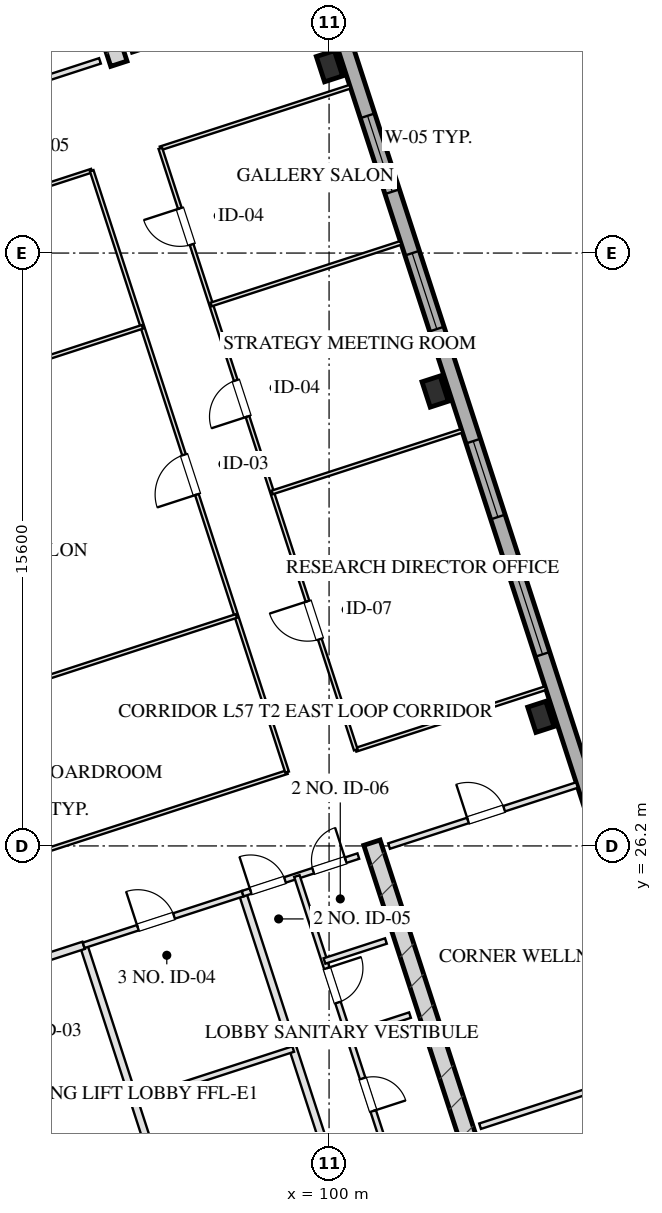
"""IFC4 building model, lengths in metres.
Left out: names, types, materials, properties, quantities, classifications, styles, units other than length and angle.
Written with IfcOpenShell. Run it as: python <this file> out.ifc"""

import sys

from ifc_helpers import new_model, si_unit, direction, frame, frame_2d, origin, origin_2d, place, context, subcontext, project, spatial, rectangle, hollow_rectangle, extrude, element, fill, save


model = new_model("IFC4")
c1 = context("Model", 3, precision=1e-05, world=origin(), true_north=direction((0.0, 1.0)))
c2 = subcontext(c1, "Body", "Model", "MODEL_VIEW")
j1 = project(units=[si_unit("LENGTHUNIT", "METRE"), si_unit("PLANEANGLEUNIT", "RADIAN")], contexts=[c1])
p1 = place(None, origin())
s1 = spatial("IfcSite", under=j1, at=p1, CompositionType="ELEMENT")
p2 = place(p1, origin())
s2 = spatial("IfcBuilding", under=s1, at=p2, CompositionType="ELEMENT")
p3 = place(p2, frame((0.0, 0.0, 212.75)))
s3 = spatial("IfcBuildingStorey", under=s2, at=p3, CompositionType="ELEMENT", Elevation=212.75)
p4 = place(p3, frame((101.128, 26.286, 0.0), z_axis=(0.0, 0.0, 1.0), x_axis=(0.309004419953, -0.951060601881, 0.0)))
e1 = element("IfcWall", 1, at=p4, inside=s3, PredefinedType="SHEAR", context=c2, shape_type="SweptSolid", body=[
    extrude(rectangle(XDim=9.33, YDim=0.45, at=frame_2d((4.665, 0.0))), origin(), (0.0, 0.0, 1.0), 3.45),
])
p5 = place(p3, frame((90.486, 20.594, 0.0), z_axis=(0.0, 0.0, 1.0), x_axis=(0.309020428229, -0.951055400562, 0.0)))
e2 = element("IfcWall", 2, at=p5, inside=s3, PredefinedType="SHEAR", context=c2, shape_type="SweptSolid", body=[
    extrude(rectangle(XDim=6.98, YDim=0.35, at=frame_2d((3.49, 0.0))), origin(), (0.0, 0.0, 1.0), 3.45),
])
p6 = place(p3, frame((94.469, 46.781, 0.0), z_axis=(0.0, 0.0, 1.0), x_axis=(-0.309004419953, 0.951060601881, 0.0)))
e3 = element("IfcWall", 3, at=p6, inside=s3, PredefinedType="SHEAR", context=c2, shape_type="SweptSolid", body=[
    extrude(rectangle(XDim=9.33, YDim=0.45, at=frame_2d((4.665, 0.0))), origin(), (0.0, 0.0, 1.0), 3.45),
])
for number, where, z_axis, x_axis in (
    (4, (105.573, 29.597, 0.0), (0.0, 0.0, 1.0), (0.951, 0.309, 0.0)),
    (5, (102.792, 38.156, 0.0), (0.0, 0.0, 1.0), (0.951, 0.309, 0.0)),
    (6, (100.01, 46.716, 0.0), (0.0, 0.0, 1.0), (0.951, 0.309, 0.0)),
):
    element("IfcColumn", number, at=place(p3, frame(where, z_axis=z_axis, x_axis=x_axis)), inside=s3, PredefinedType="COLUMN", context=c2, shape_type="SweptSolid", body=[
        extrude(hollow_rectangle(XDim=0.5, YDim=0.7, WallThickness=0.025, at=origin_2d()), origin(), (0.0, 0.0, 1.0), 3.451),
    ])
p7 = place(p3, frame((97.382, 56.586, 0.0), z_axis=(0.0, 0.0, 1.0), x_axis=(0.309016491071, -0.951056679828, 0.0)))
e7 = element("IfcWall", 7, at=p7, inside=s3, PredefinedType="SOLIDWALL", context=c2, shape_type="SweptSolid", body=[
    extrude(rectangle(XDim=38.4, YDim=0.4, at=frame_2d((19.2, 0.0))), origin(), (0.0, 0.0, 1.0), 2.55),
])
p8 = place(p7, frame((24.55, 0.0, 0.75)))
e8 = element("IfcOpeningElement", 8, at=p8, cuts=e7, PredefinedType="OPENING", context=c2, shape_type="SweptSolid", body=[
    extrude(rectangle(XDim=2.1, YDim=1.4, at=frame_2d((1.05, 0.7))), frame((0.0, 0.21, 0.0), z_axis=(0.0, -1.0, 0.0), x_axis=(1.0, 0.0, 0.0)), (0.0, 0.0, 1.0), 0.42),
])
p9 = place(p7, frame((20.75, 0.0, 0.75)))
e9 = element("IfcOpeningElement", 9, at=p9, cuts=e7, PredefinedType="OPENING", context=c2, shape_type="SweptSolid", body=[
    extrude(rectangle(XDim=2.1, YDim=1.4, at=frame_2d((1.05, 0.7))), frame((0.0, 0.21, 0.0), z_axis=(0.0, -1.0, 0.0), x_axis=(1.0, 0.0, 0.0)), (0.0, 0.0, 1.0), 0.42),
])
p10 = place(p7, frame((15.55, 0.0, 0.75)))
e10 = element("IfcOpeningElement", 10, at=p10, cuts=e7, PredefinedType="OPENING", context=c2, shape_type="SweptSolid", body=[
    extrude(rectangle(XDim=2.1, YDim=1.4, at=frame_2d((1.05, 0.7))), frame((0.0, 0.21, 0.0), z_axis=(0.0, -1.0, 0.0), x_axis=(1.0, 0.0, 0.0)), (0.0, 0.0, 1.0), 0.42),
])
p11 = place(p7, frame((11.75, 0.0, 0.75)))
e11 = element("IfcOpeningElement", 11, at=p11, cuts=e7, PredefinedType="OPENING", context=c2, shape_type="SweptSolid", body=[
    extrude(rectangle(XDim=2.1, YDim=1.4, at=frame_2d((1.05, 0.7))), frame((0.0, 0.21, 0.0), z_axis=(0.0, -1.0, 0.0), x_axis=(1.0, 0.0, 0.0)), (0.0, 0.0, 1.0), 0.42),
])
p12 = place(p3, frame((93.542, 23.585, 0.0), z_axis=(0.0, 0.0, 1.0), x_axis=(0.309042196757, -0.951048327176, 0.0)))
e12 = element("IfcWall", 12, at=p12, inside=s3, PredefinedType="PARTITIONING", context=c2, shape_type="SweptSolid", body=[
    extrude(rectangle(XDim=8.43, YDim=0.2, at=frame_2d((4.215, 0.0))), origin(), (0.0, 0.0, 1.0), 3.155),
])
p13 = place(p3, frame((89.899, 22.401, 0.0), z_axis=(0.0, 0.0, 1.0), x_axis=(0.951046716504, 0.309047153403, 0.0)))
e13 = element("IfcWall", 13, at=p13, inside=s3, PredefinedType="PARTITIONING", context=c2, shape_type="SweptSolid", body=[
    extrude(rectangle(XDim=3.83, YDim=0.2, at=frame_2d((1.915, 0.0))), origin(), (0.0, 0.0, 1.0), 3.155),
])
p14 = place(p13, frame((1.35, 0.0, 0.0)))
e14 = element("IfcOpeningElement", 14, at=p14, cuts=e13, PredefinedType="OPENING", context=c2, shape_type="SweptSolid", body=[
    extrude(rectangle(XDim=1.2, YDim=2.05, at=frame_2d((0.6, 1.025))), frame((0.0, 0.11, 0.0), z_axis=(0.0, -1.0, 0.0), x_axis=(1.0, 0.0, 0.0)), (0.0, 0.0, 1.0), 0.22),
])
p15 = place(p3, frame((97.727, 24.944, 0.0), z_axis=(0.0, 0.0, 1.0), x_axis=(0.309016001439, -0.951056838919, 0.0)))
e15 = element("IfcWall", 15, at=p15, inside=s3, PredefinedType="PARTITIONING", context=c2, shape_type="SweptSolid", body=[
    extrude(rectangle(XDim=8.43, YDim=0.2, at=frame_2d((4.215, 0.0))), origin(), (0.0, 0.0, 1.0), 3.155),
])
p16 = place(p3, frame((93.542, 23.585, 0.0), z_axis=(0.0, 0.0, 1.0), x_axis=(0.951063829732, 0.308994485023, 0.0)))
e16 = element("IfcWall", 16, at=p16, inside=s3, PredefinedType="PARTITIONING", context=c2, shape_type="SweptSolid", body=[
    extrude(rectangle(XDim=4.4, YDim=0.15, at=frame_2d((2.2, 0.0))), origin(), (0.0, 0.0, 1.0), 3.155),
])
p17 = place(p16, frame((1.5, 0.0, 0.0)))
e17 = element("IfcOpeningElement", 17, at=p17, cuts=e16, PredefinedType="OPENING", context=c2, shape_type="SweptSolid", body=[
    extrude(rectangle(XDim=1.0, YDim=2.05, at=frame_2d((0.5, 1.025))), frame((0.0, 0.085, 0.0), z_axis=(0.0, -1.0, 0.0), x_axis=(1.0, 0.0, 0.0)), (0.0, 0.0, 1.0), 0.17),
])
p18 = place(p3, frame((94.871, 19.495, 0.0), z_axis=(0.0, 0.0, 1.0), x_axis=(0.951042223598, 0.309060979314, 0.0)))
e18 = element("IfcWall", 18, at=p18, inside=s3, PredefinedType="PARTITIONING", context=c2, shape_type="SweptSolid", body=[
    extrude(rectangle(XDim=4.4, YDim=0.15, at=frame_2d((2.2, 0.0))), origin(), (0.0, 0.0, 1.0), 3.155),
])
p19 = place(p3, frame((97.727, 24.944, 0.0), z_axis=(0.0, 0.0, 1.0), x_axis=(0.951036872128, 0.309077446369, 0.0)))
e19 = element("IfcWall", 19, at=p19, inside=s3, PredefinedType="PARTITIONING", context=c2, shape_type="SweptSolid", body=[
    extrude(rectangle(XDim=3.2, YDim=0.15, at=frame_2d((1.6, 0.0))), origin(), (0.0, 0.0, 1.0), 3.155),
])
p20 = place(p19, frame((0.22, 0.0, 0.0)))
e20 = element("IfcOpeningElement", 20, at=p20, cuts=e19, PredefinedType="OPENING", context=c2, shape_type="SweptSolid", body=[
    extrude(rectangle(XDim=0.95, YDim=2.05, at=frame_2d((0.475, 1.025))), frame((0.0, 0.085, 0.0), z_axis=(0.0, -1.0, 0.0), x_axis=(1.0, 0.0, 0.0)), (0.0, 0.0, 1.0), 0.17),
])
p21 = place(p19, frame((1.95, 0.0, 0.0)))
e21 = element("IfcOpeningElement", 21, at=p21, cuts=e19, PredefinedType="OPENING", context=c2, shape_type="SweptSolid", body=[
    extrude(rectangle(XDim=0.9, YDim=2.05, at=frame_2d((0.45, 1.025))), frame((0.0, 0.085, 0.0), z_axis=(0.0, -1.0, 0.0), x_axis=(1.0, 0.0, 0.0)), (0.0, 0.0, 1.0), 0.17),
])
p22 = place(p3, frame((99.153, 25.408, 0.0), z_axis=(0.0, 0.0, 1.0), x_axis=(0.309016001439, -0.951056838919, 0.0)))
e22 = element("IfcWall", 22, at=p22, inside=s3, PredefinedType="PARTITIONING", context=c2, shape_type="SweptSolid", body=[
    extrude(rectangle(XDim=8.43, YDim=0.15, at=frame_2d((4.215, 0.0))), origin(), (0.0, 0.0, 1.0), 3.155),
])
p23 = place(p22, frame((2.55, 0.0, 0.0)))
e23 = element("IfcOpeningElement", 23, at=p23, cuts=e22, PredefinedType="OPENING", context=c2, shape_type="SweptSolid", body=[
    extrude(rectangle(XDim=0.95, YDim=2.05, at=frame_2d((0.475, 1.025))), frame((0.0, 0.085, 0.0), z_axis=(0.0, -1.0, 0.0), x_axis=(1.0, 0.0, 0.0)), (0.0, 0.0, 1.0), 0.17),
])
p24 = place(p22, frame((5.6, 0.0, 0.0)))
e24 = element("IfcOpeningElement", 24, at=p24, cuts=e22, PredefinedType="OPENING", context=c2, shape_type="SweptSolid", body=[
    extrude(rectangle(XDim=0.9, YDim=2.05, at=frame_2d((0.45, 1.025))), frame((0.0, 0.085, 0.0), z_axis=(0.0, -1.0, 0.0), x_axis=(1.0, 0.0, 0.0)), (0.0, 0.0, 1.0), 0.17),
])
for number, where, z_axis, x_axis in (
    (25, (100.513, 21.223, 0.0), (0.0, 0.0, 1.0), (0.951, 0.309, 0.0)),
    (26, (99.879, 23.173, 0.0), (0.0, 0.0, 1.0), (0.951, 0.309, 0.0)),
):
    element("IfcWall", number, at=place(p3, frame(where, z_axis=z_axis, x_axis=x_axis)), inside=s3, PredefinedType="PARTITIONING", context=c2, shape_type="SweptSolid", body=[
        extrude(rectangle(XDim=1.7, YDim=0.15, at=frame_2d((0.85, 0.0))), origin(), (0.0, 0.0, 1.0), 3.155),
    ])
p25 = place(p3, frame((90.928, 45.868, 0.0), z_axis=(0.0, 0.0, 1.0), x_axis=(0.951059297078, 0.309008435874, 0.0)))
e27 = element("IfcWall", 27, at=p25, inside=s3, PredefinedType="PARTITIONING", context=c2, shape_type="SweptSolid", body=[
    extrude(rectangle(XDim=3.2, YDim=0.15, at=frame_2d((1.6, 0.0))), origin(), (0.0, 0.0, 1.0), 3.155),
])
p26 = place(p25, frame((0.22, 0.0, 0.0)))
e28 = element("IfcOpeningElement", 28, at=p26, cuts=e27, PredefinedType="OPENING", context=c2, shape_type="SweptSolid", body=[
    extrude(rectangle(XDim=0.95, YDim=2.05, at=frame_2d((0.475, 1.025))), frame((0.0, 0.085, 0.0), z_axis=(0.0, -1.0, 0.0), x_axis=(1.0, 0.0, 0.0)), (0.0, 0.0, 1.0), 0.17),
])
p27 = place(p3, frame((103.973, 18.825, 0.0), z_axis=(0.0, 0.0, 1.0), x_axis=(0.951055112834, 0.309021313752, 0.0)))
e29 = element("IfcWall", 29, at=p27, inside=s3, PredefinedType="PARTITIONING", context=c2, shape_type="SweptSolid", body=[
    extrude(rectangle(XDim=5.2, YDim=0.15, at=frame_2d((2.6, 0.0))), origin(), (0.0, 0.0, 1.0), 3.155),
])
p28 = place(p3, frame((101.578, 26.196, 0.0), z_axis=(0.0, 0.0, 1.0), x_axis=(0.951064427824, 0.308992644131, 0.0)))
e30 = element("IfcWall", 30, at=p28, inside=s3, PredefinedType="PARTITIONING", context=c2, shape_type="SweptSolid", body=[
    extrude(rectangle(XDim=5.2, YDim=0.15, at=frame_2d((2.6, 0.0))), origin(), (0.0, 0.0, 1.0), 3.155),
])
p29 = place(p28, frame((2.184, 0.0, 0.0)))
e31 = element("IfcOpeningElement", 31, at=p29, cuts=e30, PredefinedType="OPENING", context=c2, shape_type="SweptSolid", body=[
    extrude(rectangle(XDim=1.0, YDim=2.05, at=frame_2d((0.5, 1.025))), frame((0.0, 0.085, 0.0), z_axis=(0.0, -1.0, 0.0), x_axis=(1.0, 0.0, 0.0)), (0.0, 0.0, 1.0), 0.17),
])
p30 = place(p3, frame((94.78, 47.119, 0.0), z_axis=(0.0, 0.0, 1.0), x_axis=(0.951055112834, 0.309021313752, 0.0)))
e32 = element("IfcWall", 32, at=p30, inside=s3, PredefinedType="PARTITIONING", context=c2, shape_type="SweptSolid", body=[
    extrude(rectangle(XDim=5.2, YDim=0.15, at=frame_2d((2.6, 0.0))), origin(), (0.0, 0.0, 1.0), 3.155),
])
p31 = place(p30, frame((2.184, 0.0, 0.0)))
e33 = element("IfcOpeningElement", 33, at=p31, cuts=e32, PredefinedType="OPENING", context=c2, shape_type="SweptSolid", body=[
    extrude(rectangle(XDim=1.0, YDim=2.05, at=frame_2d((0.5, 1.025))), frame((0.0, 0.085, 0.0), z_axis=(0.0, -1.0, 0.0), x_axis=(1.0, 0.0, 0.0)), (0.0, 0.0, 1.0), 0.17),
])
p32 = place(p3, frame((86.009, 23.955, 0.0), z_axis=(0.0, 0.0, 1.0), x_axis=(0.951059488241, 0.309007847517, 0.0)))
e34 = element("IfcWall", 34, at=p32, inside=s3, PredefinedType="MOVABLE", context=c2, shape_type="SweptSolid", body=[
    extrude(rectangle(XDim=13.55, YDim=0.1, at=frame_2d((6.775, 0.0))), origin(), (0.0, 0.0, 1.0), 3.155),
])
p33 = place(p3, frame((100.703, 28.729, 0.0), z_axis=(0.0, 0.0, 1.0), x_axis=(0.951055596592, 0.309019824916, 0.0)))
e35 = element("IfcWall", 35, at=p33, inside=s3, PredefinedType="MOVABLE", context=c2, shape_type="SweptSolid", body=[
    extrude(rectangle(XDim=5.25, YDim=0.1, at=frame_2d((2.625, 0.0))), origin(), (0.0, 0.0, 1.0), 3.155),
])
p34 = place(p3, frame((80.867, 39.781, 0.0), z_axis=(0.0, 0.0, 1.0), x_axis=(0.951054192928, 0.309024144872, 0.0)))
e36 = element("IfcWall", 36, at=p34, inside=s3, PredefinedType="MOVABLE", context=c2, shape_type="SweptSolid", body=[
    extrude(rectangle(XDim=13.55, YDim=0.1, at=frame_2d((6.775, 0.0))), origin(), (0.0, 0.0, 1.0), 3.155),
])
p35 = place(p3, frame((95.561, 44.555, 0.0), z_axis=(0.0, 0.0, 1.0), x_axis=(0.951055596592, 0.309019824916, 0.0)))
e37 = element("IfcWall", 37, at=p35, inside=s3, PredefinedType="MOVABLE", context=c2, shape_type="SweptSolid", body=[
    extrude(rectangle(XDim=5.25, YDim=0.1, at=frame_2d((2.625, 0.0))), origin(), (0.0, 0.0, 1.0), 3.155),
])
p36 = place(p3, frame((98.896, 28.142, 0.0), z_axis=(0.0, 0.0, 1.0), x_axis=(-0.30901773025, 0.951056277195, 0.0)))
e38 = element("IfcWall", 38, at=p36, inside=s3, PredefinedType="MOVABLE", context=c2, shape_type="SweptSolid", body=[
    extrude(rectangle(XDim=16.64, YDim=0.1, at=frame_2d((8.32, 0.0))), origin(), (0.0, 0.0, 1.0), 3.155),
])
p37 = place(p36, frame((7.68, 0.0, 0.0)))
e39 = element("IfcOpeningElement", 39, at=p37, cuts=e38, PredefinedType="OPENING", context=c2, shape_type="SweptSolid", body=[
    extrude(rectangle(XDim=1.1, YDim=2.05, at=frame_2d((0.55, 1.025))), frame((0.0, 0.06, 0.0), z_axis=(0.0, -1.0, 0.0), x_axis=(1.0, 0.0, 0.0)), (0.0, 0.0, 1.0), 0.12),
])
p38 = place(p3, frame((100.703, 28.729, 0.0), z_axis=(0.0, 0.0, 1.0), x_axis=(-0.30901773025, 0.951056277195, 0.0)))
e40 = element("IfcWall", 40, at=p38, inside=s3, PredefinedType="MOVABLE", context=c2, shape_type="SweptSolid", body=[
    extrude(rectangle(XDim=16.64, YDim=0.1, at=frame_2d((8.32, 0.0))), origin(), (0.0, 0.0, 1.0), 3.155),
])
p39 = place(p38, frame((3.06, 0.0, 0.0)))
e41 = element("IfcOpeningElement", 41, at=p39, cuts=e40, PredefinedType="OPENING", context=c2, shape_type="SweptSolid", body=[
    extrude(rectangle(XDim=1.05, YDim=2.05, at=frame_2d((0.525, 1.025))), frame((0.0, 0.06, 0.0), z_axis=(0.0, -1.0, 0.0), x_axis=(1.0, 0.0, 0.0)), (0.0, 0.0, 1.0), 0.12),
])
p40 = place(p38, frame((9.22, 0.0, 0.0)))
e42 = element("IfcOpeningElement", 42, at=p40, cuts=e40, PredefinedType="OPENING", context=c2, shape_type="SweptSolid", body=[
    extrude(rectangle(XDim=1.0, YDim=2.05, at=frame_2d((0.5, 1.025))), frame((0.0, 0.06, 0.0), z_axis=(0.0, -1.0, 0.0), x_axis=(1.0, 0.0, 0.0)), (0.0, 0.0, 1.0), 0.12),
])
p41 = place(p38, frame((13.98, 0.0, 0.0)))
e43 = element("IfcOpeningElement", 43, at=p41, cuts=e40, PredefinedType="OPENING", context=c2, shape_type="SweptSolid", body=[
    extrude(rectangle(XDim=1.0, YDim=2.05, at=frame_2d((0.5, 1.025))), frame((0.0, 0.06, 0.0), z_axis=(0.0, -1.0, 0.0), x_axis=(1.0, 0.0, 0.0)), (0.0, 0.0, 1.0), 0.12),
])
p42 = place(p3, frame((84.674, 28.063, 0.0), z_axis=(0.0, 0.0, 1.0), x_axis=(0.951054192928, 0.309024144872, 0.0)))
e44 = element("IfcWall", 44, at=p42, inside=s3, PredefinedType="MOVABLE", context=c2, shape_type="SweptSolid", body=[
    extrude(rectangle(XDim=13.55, YDim=0.1, at=frame_2d((6.775, 0.0))), origin(), (0.0, 0.0, 1.0), 3.155),
])
p43 = place(p3, frame((82.202, 35.672, 0.0), z_axis=(0.0, 0.0, 1.0), x_axis=(0.951059488241, 0.309007847517, 0.0)))
e45 = element("IfcWall", 45, at=p43, inside=s3, PredefinedType="MOVABLE", context=c2, shape_type="SweptSolid", body=[
    extrude(rectangle(XDim=13.55, YDim=0.1, at=frame_2d((6.775, 0.0))), origin(), (0.0, 0.0, 1.0), 3.155),
])
for number, where, z_axis, x_axis in (
    (46, (98.502, 35.501, 0.0), (0.0, 0.0, 1.0), (0.951, 0.309, 0.0)),
    (47, (96.896, 40.446, 0.0), (0.0, 0.0, 1.0), (0.951, 0.309, 0.0)),
):
    element("IfcWall", number, at=place(p3, frame(where, z_axis=z_axis, x_axis=x_axis)), inside=s3, PredefinedType="MOVABLE", context=c2, shape_type="SweptSolid", body=[
        extrude(rectangle(XDim=5.25, YDim=0.1, at=frame_2d((2.625, 0.0))), origin(), (0.0, 0.0, 1.0), 3.155),
    ])
p44 = place(p8, origin())
e48 = element("IfcWindow", 48, at=p44, inside=s3, PartitioningType="TRIPLE_PANEL_VERTICAL", PredefinedType="WINDOW", context=c2, shape_type="SweptSolid", body=[
    extrude(rectangle(XDim=2.1, YDim=1.4, at=frame_2d((1.05, 0.7))), frame((0.0, 0.03, 0.0), z_axis=(0.0, -1.0, 0.0), x_axis=(1.0, 0.0, 0.0)), (0.0, 0.0, 1.0), 0.06),
])
fill(e8, e48)
p45 = place(p9, origin())
e49 = element("IfcWindow", 49, at=p45, inside=s3, PartitioningType="TRIPLE_PANEL_VERTICAL", PredefinedType="WINDOW", context=c2, shape_type="SweptSolid", body=[
    extrude(rectangle(XDim=2.1, YDim=1.4, at=frame_2d((1.05, 0.7))), frame((0.0, 0.03, 0.0), z_axis=(0.0, -1.0, 0.0), x_axis=(1.0, 0.0, 0.0)), (0.0, 0.0, 1.0), 0.06),
])
fill(e9, e49)
p46 = place(p10, origin())
e50 = element("IfcWindow", 50, at=p46, inside=s3, PartitioningType="TRIPLE_PANEL_VERTICAL", PredefinedType="WINDOW", context=c2, shape_type="SweptSolid", body=[
    extrude(rectangle(XDim=2.1, YDim=1.4, at=frame_2d((1.05, 0.7))), frame((0.0, 0.03, 0.0), z_axis=(0.0, -1.0, 0.0), x_axis=(1.0, 0.0, 0.0)), (0.0, 0.0, 1.0), 0.06),
])
fill(e10, e50)
p47 = place(p11, origin())
e51 = element("IfcWindow", 51, at=p47, inside=s3, PartitioningType="TRIPLE_PANEL_VERTICAL", PredefinedType="WINDOW", context=c2, shape_type="SweptSolid", body=[
    extrude(rectangle(XDim=2.1, YDim=1.4, at=frame_2d((1.05, 0.7))), frame((0.0, 0.03, 0.0), z_axis=(0.0, -1.0, 0.0), x_axis=(1.0, 0.0, 0.0)), (0.0, 0.0, 1.0), 0.06),
])
fill(e11, e51)
p48 = place(p17, origin())
e52 = element("IfcDoor", 52, at=p48, inside=s3, OperationType="SINGLE_SWING_LEFT", PredefinedType="DOOR", context=c2, shape_type="SweptSolid", body=[
    extrude(rectangle(XDim=1.0, YDim=2.05, at=frame_2d((0.5, 1.025))), frame((0.0, 0.025, 0.0), z_axis=(0.0, -1.0, 0.0), x_axis=(1.0, 0.0, 0.0)), (0.0, 0.0, 1.0), 0.05),
])
fill(e17, e52)
p49 = place(p20, origin())
e53 = element("IfcDoor", 53, at=p49, inside=s3, OperationType="SINGLE_SWING_LEFT", PredefinedType="DOOR", context=c2, shape_type="SweptSolid", body=[
    extrude(rectangle(XDim=0.95, YDim=2.05, at=frame_2d((0.475, 1.025))), frame((0.0, 0.025, 0.0), z_axis=(0.0, -1.0, 0.0), x_axis=(1.0, 0.0, 0.0)), (0.0, 0.0, 1.0), 0.05),
])
fill(e20, e53)
p50 = place(p21, origin())
e54 = element("IfcDoor", 54, at=p50, inside=s3, OperationType="SINGLE_SWING_RIGHT", PredefinedType="DOOR", context=c2, shape_type="SweptSolid", body=[
    extrude(rectangle(XDim=0.9, YDim=2.05, at=frame_2d((0.45, 1.025))), frame((0.0, 0.025, 0.0), z_axis=(0.0, -1.0, 0.0), x_axis=(1.0, 0.0, 0.0)), (0.0, 0.0, 1.0), 0.05),
])
fill(e21, e54)
p51 = place(p23, origin())
e55 = element("IfcDoor", 55, at=p51, inside=s3, OperationType="SINGLE_SWING_LEFT", PredefinedType="DOOR", context=c2, shape_type="SweptSolid", body=[
    extrude(rectangle(XDim=0.95, YDim=2.05, at=frame_2d((0.475, 1.025))), frame((0.0, 0.025, 0.0), z_axis=(0.0, -1.0, 0.0), x_axis=(1.0, 0.0, 0.0)), (0.0, 0.0, 1.0), 0.05),
])
fill(e23, e55)
p52 = place(p24, origin())
e56 = element("IfcDoor", 56, at=p52, inside=s3, OperationType="SINGLE_SWING_RIGHT", PredefinedType="DOOR", context=c2, shape_type="SweptSolid", body=[
    extrude(rectangle(XDim=0.9, YDim=2.05, at=frame_2d((0.45, 1.025))), frame((0.0, 0.025, 0.0), z_axis=(0.0, -1.0, 0.0), x_axis=(1.0, 0.0, 0.0)), (0.0, 0.0, 1.0), 0.05),
])
fill(e24, e56)
p53 = place(p29, origin())
e57 = element("IfcDoor", 57, at=p53, inside=s3, OperationType="SINGLE_SWING_LEFT", PredefinedType="DOOR", context=c2, shape_type="SweptSolid", body=[
    extrude(rectangle(XDim=1.0, YDim=2.05, at=frame_2d((0.5, 1.025))), frame((0.0, 0.025, 0.0), z_axis=(0.0, -1.0, 0.0), x_axis=(1.0, 0.0, 0.0)), (0.0, 0.0, 1.0), 0.05),
])
fill(e31, e57)
p54 = place(p37, origin())
e58 = element("IfcDoor", 58, at=p54, inside=s3, OperationType="SINGLE_SWING_LEFT", PredefinedType="DOOR", context=c2, shape_type="SweptSolid", body=[
    extrude(rectangle(XDim=1.1, YDim=2.05, at=frame_2d((0.55, 1.025))), frame((0.0, 0.025, 0.0), z_axis=(0.0, -1.0, 0.0), x_axis=(1.0, 0.0, 0.0)), (0.0, 0.0, 1.0), 0.05),
])
fill(e39, e58)
p55 = place(p39, origin())
e59 = element("IfcDoor", 59, at=p55, inside=s3, OperationType="SINGLE_SWING_RIGHT", PredefinedType="DOOR", context=c2, shape_type="SweptSolid", body=[
    extrude(rectangle(XDim=1.05, YDim=2.05, at=frame_2d((0.525, 1.025))), frame((0.0, 0.025, 0.0), z_axis=(0.0, -1.0, 0.0), x_axis=(1.0, 0.0, 0.0)), (0.0, 0.0, 1.0), 0.05),
])
fill(e41, e59)
p56 = place(p40, origin())
e60 = element("IfcDoor", 60, at=p56, inside=s3, OperationType="SINGLE_SWING_LEFT", PredefinedType="DOOR", context=c2, shape_type="SweptSolid", body=[
    extrude(rectangle(XDim=1.0, YDim=2.05, at=frame_2d((0.5, 1.025))), frame((0.0, 0.025, 0.0), z_axis=(0.0, -1.0, 0.0), x_axis=(1.0, 0.0, 0.0)), (0.0, 0.0, 1.0), 0.05),
])
fill(e42, e60)
p57 = place(p41, origin())
e61 = element("IfcDoor", 61, at=p57, inside=s3, OperationType="SINGLE_SWING_RIGHT", PredefinedType="DOOR", context=c2, shape_type="SweptSolid", body=[
    extrude(rectangle(XDim=1.0, YDim=2.05, at=frame_2d((0.5, 1.025))), frame((0.0, 0.025, 0.0), z_axis=(0.0, -1.0, 0.0), x_axis=(1.0, 0.0, 0.0)), (0.0, 0.0, 1.0), 0.05),
])
fill(e43, e61)
save(model, sys.argv[1])
